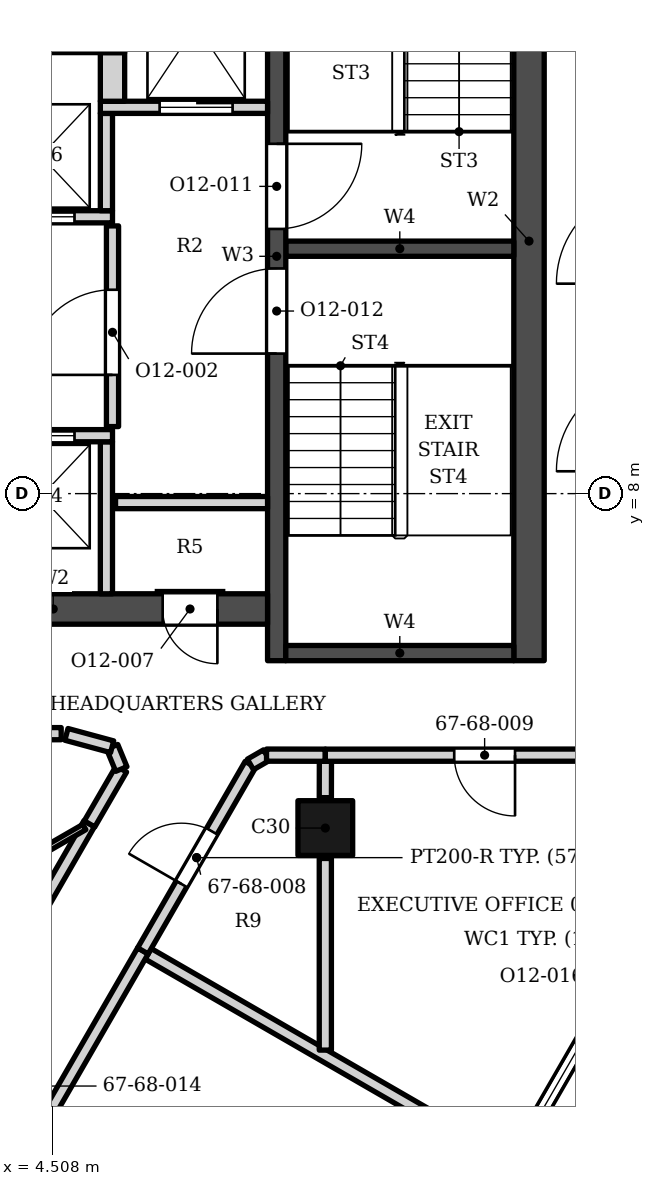
"""IFC4 building model, lengths in metres.
Left out: names, types, materials, properties, quantities, classifications, styles, units other than length and angle.
Written with IfcOpenShell. Run it as: python <this file> out.ifc"""

import sys

from ifc_helpers import new_model, si_unit, direction, frame, frame_2d, origin, origin_2d, place, context, subcontext, project, spatial, rectangle, extrude, element, fill, save


model = new_model("IFC4")
c1 = context("Model", 3, precision=1e-05, world=origin(), true_north=direction((0.0, 1.0)))
c2 = subcontext(c1, "Body", "Model", "MODEL_VIEW")
j1 = project(units=[si_unit("LENGTHUNIT", "METRE"), si_unit("PLANEANGLEUNIT", "RADIAN")], contexts=[c1])
p1 = place(None, origin())
s1 = spatial("IfcSite", under=j1, at=p1, CompositionType="ELEMENT")
p2 = place(p1, origin())
s2 = spatial("IfcBuilding", under=s1, at=p2, CompositionType="ELEMENT")
p3 = place(p2, frame((0.0, 0.0, 279.4)))
s3 = spatial("IfcBuildingStorey", under=s2, at=p3, CompositionType="ELEMENT", Elevation=279.4)
p4 = place(p3, frame((12.35, 5.253, 0.0), z_axis=(0.0, 0.0, 1.0), x_axis=(0.0, 1.0, 0.0)))
e1 = element("IfcWall", 1, at=p4, inside=s3, PredefinedType="SHEAR", context=c2, shape_type="SweptSolid", body=[
    extrude(rectangle(XDim=13.8, YDim=0.5, at=frame_2d((6.9, 0.0))), origin(), (0.0, 0.0, 1.0), 3.9),
])
p5 = place(p3, frame((8.2, 5.253, 0.0), z_axis=(0.0, 0.0, 1.0), x_axis=(0.0, 1.0, 0.0)))
e2 = element("IfcWall", 2, at=p5, inside=s3, PredefinedType="SHEAR", context=c2, shape_type="SweptSolid", body=[
    extrude(rectangle(XDim=13.3, YDim=0.3, at=frame_2d((6.65, 0.0))), origin(), (0.0, 0.0, 1.0), 3.9),
])
p6 = place(p5, frame((7.1, 0.0, 0.0)))
e3 = element("IfcOpeningElement", 3, at=p6, cuts=e2, PredefinedType="OPENING", context=c2, shape_type="SweptSolid", body=[
    extrude(rectangle(XDim=1.4, YDim=2.1, at=frame_2d((0.7, 1.05))), frame((0.0, 0.16, 0.0), z_axis=(0.0, -1.0, 0.0), x_axis=(1.0, 0.0, 0.0)), (0.0, 0.0, 1.0), 0.32),
])
p7 = place(p5, frame((5.05, 0.0, 0.0)))
e4 = element("IfcOpeningElement", 4, at=p7, cuts=e2, PredefinedType="OPENING", context=c2, shape_type="SweptSolid", body=[
    extrude(rectangle(XDim=1.4, YDim=2.1, at=frame_2d((0.7, 1.05))), frame((0.0, 0.16, 0.0), z_axis=(0.0, -1.0, 0.0), x_axis=(1.0, 0.0, 0.0)), (0.0, 0.0, 1.0), 0.32),
])
for number, where, z_axis, x_axis in (
    (5, (8.35, 12.028, 0.0), (0.0, 0.0, 1.0), (1.0, 0.0, 0.0)),
    (6, (8.35, 5.378, 0.0), (0.0, 0.0, 1.0), (1.0, 0.0, 0.0)),
):
    element("IfcWall", number, at=place(p3, frame(where, z_axis=z_axis, x_axis=x_axis)), inside=s3, PredefinedType="SHEAR", context=c2, shape_type="SweptSolid", body=[
        extrude(rectangle(XDim=3.75, YDim=0.25, at=frame_2d((1.875, 0.0))), origin(), (0.0, 0.0, 1.0), 3.9),
    ])
p8 = place(p3, frame((1.0, 6.103, 0.0), z_axis=(0.0, 0.0, 1.0), x_axis=(1.0, 0.0, 0.0)))
e7 = element("IfcWall", 7, at=p8, inside=s3, PredefinedType="SHEAR", context=c2, shape_type="SweptSolid", body=[
    extrude(rectangle(XDim=7.05, YDim=0.5, at=frame_2d((3.525, 0.0))), origin(), (0.0, 0.0, 1.0), 3.9),
])
p9 = place(p8, frame((5.325, 0.0, 0.0)))
e8 = element("IfcOpeningElement", 8, at=p9, cuts=e7, PredefinedType="OPENING", context=c2, shape_type="SweptSolid", body=[
    extrude(rectangle(XDim=0.9, YDim=2.1, at=frame_2d((0.45, 1.05))), frame((0.0, 0.26, 0.0), z_axis=(0.0, -1.0, 0.0), x_axis=(1.0, 0.0, 0.0)), (0.0, 0.0, 1.0), 0.52),
])
p10 = place(p3, frame((9.0, 2.5, 0.0), z_axis=(0.0, 0.0, 1.0), x_axis=(1.0, 0.0, 0.0)))
e9 = element("IfcColumn", 9, at=p10, inside=s3, PredefinedType="COLUMN", context=c2, shape_type="SweptSolid", body=[
    extrude(rectangle(XDim=0.9, YDim=0.9, at=origin_2d()), origin(), (0.0, 0.0, 1.0), 3.9),
])
p11 = place(p3, frame((12.135, -2.889, 0.0), z_axis=(0.0, 0.0, 1.0), x_axis=(0.500027713859, 0.866009402589, 0.0)))
e10 = element("IfcWall", 10, at=p11, inside=s3, PredefinedType="ELEMENTEDWALL", context=c2, shape_type="SweptSolid", body=[
    extrude(rectangle(XDim=4.2, YDim=0.2, at=frame_2d((2.1, 0.0))), origin(), (0.0, 0.0, 1.0), 3.0),
])
p12 = place(p11, frame((0.2, 0.0, 0.45)))
e11 = element("IfcOpeningElement", 11, at=p12, cuts=e10, PredefinedType="OPENING", context=c2, shape_type="SweptSolid", body=[
    extrude(rectangle(XDim=2.4, YDim=2.25, at=frame_2d((1.2, 1.125))), frame((0.0, 0.11, 0.0), z_axis=(0.0, -1.0, 0.0), x_axis=(1.0, 0.0, 0.0)), (0.0, 0.0, 1.0), 0.22),
])
p13 = place(p11, frame((2.8, 0.0, 0.0)))
e12 = element("IfcOpeningElement", 12, at=p13, cuts=e10, PredefinedType="OPENING", context=c2, shape_type="SweptSolid", body=[
    extrude(rectangle(XDim=1.2, YDim=2.7, at=frame_2d((0.6, 1.35))), frame((0.0, 0.11, 0.0), z_axis=(0.0, -1.0, 0.0), x_axis=(1.0, 0.0, 0.0)), (0.0, 0.0, 1.0), 0.22),
])
for number, where, z_axis, x_axis in (
    (13, (5.4, 6.353, 0.0), (0.0, 0.0, 1.0), (0.0, 1.0, 0.0)),
    (14, (5.55, 7.853, 0.0), (0.0, 0.0, 1.0), (1.0, 0.0, 0.0)),
):
    element("IfcWall", number, at=place(p3, frame(where, z_axis=z_axis, x_axis=x_axis)), inside=s3, PredefinedType="SOLIDWALL", context=c2, shape_type="SweptSolid", body=[
        extrude(rectangle(XDim=2.5, YDim=0.2, at=frame_2d((1.25, 0.0))), origin(), (0.0, 0.0, 1.0), 3.73),
    ])
p14 = place(p3, frame((1.0, 8.953, 0.0), z_axis=(0.0, 0.0, 1.0), x_axis=(1.0, 0.0, 0.0)))
e15 = element("IfcWall", 15, at=p14, inside=s3, PredefinedType="SOLIDWALL", context=c2, shape_type="SweptSolid", body=[
    extrude(rectangle(XDim=4.5, YDim=0.2, at=frame_2d((2.25, 0.0))), origin(), (0.0, 0.0, 1.0), 3.73),
])
p15 = place(p14, frame((0.625, 0.0, 0.0)))
e16 = element("IfcOpeningElement", 16, at=p15, cuts=e15, PredefinedType="OPENING", context=c2, shape_type="SweptSolid", body=[
    extrude(rectangle(XDim=1.1, YDim=2.1, at=frame_2d((0.55, 1.05))), frame((0.0, 0.11, 0.0), z_axis=(0.0, -1.0, 0.0), x_axis=(1.0, 0.0, 0.0)), (0.0, 0.0, 1.0), 0.22),
])
p16 = place(p14, frame((2.775, 0.0, 0.0)))
e17 = element("IfcOpeningElement", 17, at=p16, cuts=e15, PredefinedType="OPENING", context=c2, shape_type="SweptSolid", body=[
    extrude(rectangle(XDim=1.1, YDim=2.1, at=frame_2d((0.55, 1.05))), frame((0.0, 0.11, 0.0), z_axis=(0.0, -1.0, 0.0), x_axis=(1.0, 0.0, 0.0)), (0.0, 0.0, 1.0), 0.22),
])
p17 = place(p3, frame((5.5, 9.103, 0.0), z_axis=(0.0, 0.0, 1.0), x_axis=(0.0, 1.0, 0.0)))
e18 = element("IfcWall", 18, at=p17, inside=s3, PredefinedType="SOLIDWALL", context=c2, shape_type="SweptSolid", body=[
    extrude(rectangle(XDim=3.3, YDim=0.2, at=frame_2d((1.65, 0.0))), origin(), (0.0, 0.0, 1.0), 3.73),
])
p18 = place(p17, frame((0.85, 0.0, 0.0)))
e19 = element("IfcOpeningElement", 19, at=p18, cuts=e18, PredefinedType="OPENING", context=c2, shape_type="SweptSolid", body=[
    extrude(rectangle(XDim=1.4, YDim=2.1, at=frame_2d((0.7, 1.05))), frame((0.0, 0.11, 0.0), z_axis=(0.0, -1.0, 0.0), x_axis=(1.0, 0.0, 0.0)), (0.0, 0.0, 1.0), 0.22),
])
p19 = place(p3, frame((-1.5, 12.552, 0.0), z_axis=(0.0, 0.0, 1.0), x_axis=(1.0, 0.0, 0.0)))
e20 = element("IfcWall", 20, at=p19, inside=s3, PredefinedType="SOLIDWALL", context=c2, shape_type="SweptSolid", body=[
    extrude(rectangle(XDim=7.0, YDim=0.2, at=frame_2d((3.5, 0.0))), origin(), (0.0, 0.0, 1.0), 3.73),
])
p20 = place(p19, frame((3.075, 0.0, 0.0)))
e21 = element("IfcOpeningElement", 21, at=p20, cuts=e20, PredefinedType="OPENING", context=c2, shape_type="SweptSolid", body=[
    extrude(rectangle(XDim=1.1, YDim=2.1, at=frame_2d((0.55, 1.05))), frame((0.0, 0.11, 0.0), z_axis=(0.0, -1.0, 0.0), x_axis=(1.0, 0.0, 0.0)), (0.0, 0.0, 1.0), 0.22),
])
p21 = place(p19, frame((5.275, 0.0, 0.0)))
e22 = element("IfcOpeningElement", 22, at=p21, cuts=e20, PredefinedType="OPENING", context=c2, shape_type="SweptSolid", body=[
    extrude(rectangle(XDim=1.1, YDim=2.1, at=frame_2d((0.55, 1.05))), frame((0.0, 0.11, 0.0), z_axis=(0.0, -1.0, 0.0), x_axis=(1.0, 0.0, 0.0)), (0.0, 0.0, 1.0), 0.22),
])
p22 = place(p3, frame((5.4, 12.653, 0.0), z_axis=(0.0, 0.0, 1.0), x_axis=(0.0, 1.0, 0.0)))
e23 = element("IfcWall", 23, at=p22, inside=s3, PredefinedType="SOLIDWALL", context=c2, shape_type="SweptSolid", body=[
    extrude(rectangle(XDim=1.6, YDim=0.2, at=frame_2d((0.8, 0.0))), origin(), (0.0, 0.0, 1.0), 3.73),
])
p23 = place(p3, frame((5.3, 14.353, 0.0), z_axis=(0.0, 0.0, 1.0), x_axis=(1.0, 0.0, 0.0)))
e24 = element("IfcWall", 24, at=p23, inside=s3, PredefinedType="SOLIDWALL", context=c2, shape_type="SweptSolid", body=[
    extrude(rectangle(XDim=2.75, YDim=0.2, at=frame_2d((1.375, 0.0))), origin(), (0.0, 0.0, 1.0), 3.73),
])
p24 = place(p23, frame((0.975, 0.0, 0.0)))
e25 = element("IfcOpeningElement", 25, at=p24, cuts=e24, PredefinedType="OPENING", context=c2, shape_type="SweptSolid", body=[
    extrude(rectangle(XDim=1.2, YDim=2.1, at=frame_2d((0.6, 1.05))), frame((0.0, 0.11, 0.0), z_axis=(0.0, -1.0, 0.0), x_axis=(1.0, 0.0, 0.0)), (0.0, 0.0, 1.0), 0.22),
])
p25 = place(p3, frame((5.5, 14.453, 0.0), z_axis=(0.0, 0.0, 1.0), x_axis=(0.0, 1.0, 0.0)))
e26 = element("IfcWall", 26, at=p25, inside=s3, PredefinedType="SOLIDWALL", context=c2, shape_type="SweptSolid", body=[
    extrude(rectangle(XDim=0.8, YDim=0.4, at=frame_2d((0.4, 0.0))), origin(), (0.0, 0.0, 1.0), 3.73),
])
p26 = place(p3, frame((-1.5, 15.353, 0.0), z_axis=(0.0, 0.0, 1.0), x_axis=(1.0, 0.0, 0.0)))
e27 = element("IfcWall", 27, at=p26, inside=s3, PredefinedType="SOLIDWALL", context=c2, shape_type="SweptSolid", body=[
    extrude(rectangle(XDim=7.2, YDim=0.2, at=frame_2d((3.6, 0.0))), origin(), (0.0, 0.0, 1.0), 3.73),
])
p27 = place(p3, frame((0.898, -4.751, 0.0), z_axis=(0.0, 0.0, 1.0), x_axis=(0.499141293918, 0.866520610664, 0.0)))
e28 = element("IfcWall", 28, at=p27, inside=s3, PredefinedType="PARTITIONING", context=c2, shape_type="SweptSolid", body=[
    extrude(rectangle(XDim=8.451, YDim=0.2, at=frame_2d((4.226, 0.0))), origin(), (0.0, 0.0, 1.0), 2.884),
])
p28 = place(p3, frame((6.086, 0.433, 0.0), z_axis=(0.0, 0.0, 1.0), x_axis=(0.866035557451, -0.499982412921, 0.0)))
e29 = element("IfcWall", 29, at=p28, inside=s3, PredefinedType="PARTITIONING", context=c2, shape_type="SweptSolid", body=[
    extrude(rectangle(XDim=6.449, YDim=0.2, at=frame_2d((3.225, 0.0))), origin(), (0.0, 0.0, 1.0), 3.052),
])
p29 = place(p3, frame((1.5, -7.314, 0.0), z_axis=(0.0, 0.0, 1.0), x_axis=(0.499990139034, 0.866031096941, 0.0)))
e30 = element("IfcWall", 30, at=p29, inside=s3, PredefinedType="PARTITIONING", context=c2, shape_type="SweptSolid", body=[
    extrude(rectangle(XDim=9.0, YDim=0.2, at=frame_2d((4.5, 0.0))), origin(), (0.0, 0.0, 1.0), 2.884),
])
p30 = place(p29, frame((4.0, 0.0, 0.0)))
e31 = element("IfcOpeningElement", 31, at=p30, cuts=e30, PredefinedType="OPENING", context=c2, shape_type="SweptSolid", body=[
    extrude(rectangle(XDim=1.0, YDim=2.1, at=frame_2d((0.5, 1.05))), frame((0.0, 0.11, 0.0), z_axis=(0.0, -1.0, 0.0), x_axis=(1.0, 0.0, 0.0)), (0.0, 0.0, 1.0), 0.22),
])
p31 = place(p3, frame((9.0, -1.152, 0.0), z_axis=(0.0, 0.0, 1.0), x_axis=(0.0, 1.0, 0.0)))
e32 = element("IfcWall", 32, at=p31, inside=s3, PredefinedType="PARTITIONING", context=c2, shape_type="SweptSolid", body=[
    extrude(rectangle(XDim=3.152, YDim=0.2, at=frame_2d((1.576, 0.0))), origin(), (0.0, 0.0, 1.0), 3.052),
])
p32 = place(p3, frame((0.19, -0.281, 0.0), z_axis=(0.0, 0.0, 1.0), x_axis=(0.866035935605, 0.499981757907, 0.0)))
e33 = element("IfcWall", 33, at=p32, inside=s3, PredefinedType="PARTITIONING", context=c2, shape_type="SweptSolid", body=[
    extrude(rectangle(XDim=5.596, YDim=0.1, at=frame_2d((2.798, 0.0))), origin(), (0.0, 0.0, 1.0), 2.884),
])
p33 = place(p3, frame((5.122, 2.569, 0.0), z_axis=(0.0, 0.0, 1.0), x_axis=(0.501525356051, 0.86514294613, 0.0)))
e34 = element("IfcWall", 34, at=p33, inside=s3, PredefinedType="PARTITIONING", context=c2, shape_type="SweptSolid", body=[
    extrude(rectangle(XDim=1.043, YDim=0.2, at=frame_2d((0.521, 0.0))), origin(), (0.0, 0.0, 1.0), 3.73),
])
p34 = place(p3, frame((5.494, 3.837, 0.0), z_axis=(0.0, 0.0, 1.0), x_axis=(0.381462580175, -0.924384281523, 0.0)))
e35 = element("IfcWall", 35, at=p34, inside=s3, PredefinedType="PARTITIONING", context=c2, shape_type="SweptSolid", body=[
    extrude(rectangle(XDim=0.396, YDim=0.2, at=frame_2d((0.198, 0.0))), origin(), (0.0, 0.0, 1.0), 3.73),
])
p35 = place(p3, frame((6.0, 0.481, 0.0), z_axis=(0.0, 0.0, 1.0), x_axis=(0.499648797631, 0.866228075639, 0.0)))
e36 = element("IfcWall", 36, at=p35, inside=s3, PredefinedType="PARTITIONING", context=c2, shape_type="SweptSolid", body=[
    extrude(rectangle(XDim=3.539, YDim=0.2, at=frame_2d((1.77, 0.0))), origin(), (0.0, 0.0, 1.0), 3.73),
])
p36 = place(p35, frame((1.27, 0.0, 0.0)))
e37 = element("IfcOpeningElement", 37, at=p36, cuts=e36, PredefinedType="OPENING", context=c2, shape_type="SweptSolid", body=[
    extrude(rectangle(XDim=1.0, YDim=2.4, at=frame_2d((0.5, 1.2))), frame((0.0, 0.11, 0.0), z_axis=(0.0, -1.0, 0.0), x_axis=(1.0, 0.0, 0.0)), (0.0, 0.0, 1.0), 0.22),
])
p37 = place(p3, frame((9.0, 3.0, 0.0), z_axis=(0.0, 0.0, 1.0), x_axis=(0.002442989453, 0.999997015897, 0.0)))
e38 = element("IfcWall", 38, at=p37, inside=s3, PredefinedType="PARTITIONING", context=c2, shape_type="SweptSolid", body=[
    extrude(rectangle(XDim=0.6, YDim=0.2, at=frame_2d((0.3, 0.0))), origin(), (0.0, 0.0, 1.0), 3.332),
])
p38 = place(p3, frame((7.768, 3.546, 0.0), z_axis=(0.0, 0.0, 1.0), x_axis=(0.865826662844, 0.500344071524, 0.0)))
e39 = element("IfcWall", 39, at=p38, inside=s3, PredefinedType="PARTITIONING", context=c2, shape_type="SweptSolid", body=[
    extrude(rectangle(XDim=0.306, YDim=0.2, at=frame_2d((0.153, 0.0))), origin(), (0.0, 0.0, 1.0), 3.73),
])
p39 = place(p3, frame((8.033, 3.699, 0.0), z_axis=(0.0, 0.0, 1.0), x_axis=(0.99999885216, -0.001515149776, 0.0)))
e40 = element("IfcWall", 40, at=p39, inside=s3, PredefinedType="PARTITIONING", context=c2, shape_type="SweptSolid", body=[
    extrude(rectangle(XDim=0.967, YDim=0.2, at=frame_2d((0.483, 0.0))), origin(), (0.0, 0.0, 1.0), 3.73),
])
p40 = place(p3, frame((9.0, 3.698, 0.0), z_axis=(0.0, 0.0, 1.0), x_axis=(0.999999960922, 0.000279563869, 0.0)))
e41 = element("IfcWall", 41, at=p40, inside=s3, PredefinedType="PARTITIONING", context=c2, shape_type="SweptSolid", body=[
    extrude(rectangle(XDim=5.24, YDim=0.2, at=frame_2d((2.62, 0.0))), origin(), (0.0, 0.0, 1.0), 3.73),
])
p41 = place(p40, frame((2.12, 0.0, 0.0)))
e42 = element("IfcOpeningElement", 42, at=p41, cuts=e41, PredefinedType="OPENING", context=c2, shape_type="SweptSolid", body=[
    extrude(rectangle(XDim=1.0, YDim=2.4, at=frame_2d((0.5, 1.2))), frame((0.0, 0.11, 0.0), z_axis=(0.0, -1.0, 0.0), x_axis=(1.0, 0.0, 0.0)), (0.0, 0.0, 1.0), 0.22),
])
p42 = place(p3, frame((4.742, 4.041, 0.0), z_axis=(0.0, 0.0, 1.0), x_axis=(0.965081274591, -0.261950631675, 0.0)))
e43 = element("IfcWall", 43, at=p42, inside=s3, PredefinedType="PARTITIONING", context=c2, shape_type="SweptSolid", body=[
    extrude(rectangle(XDim=0.779, YDim=0.2, at=frame_2d((0.39, 0.0))), origin(), (0.0, 0.0, 1.0), 3.73),
])
p43 = place(p3, frame((3.502, 4.051, 0.0), z_axis=(0.0, 0.0, 1.0), x_axis=(0.999998904, 0.001480539832, 0.0)))
e44 = element("IfcWall", 44, at=p43, inside=s3, PredefinedType="PARTITIONING", context=c2, shape_type="SweptSolid", body=[
    extrude(rectangle(XDim=1.154, YDim=0.2, at=frame_2d((0.577, 0.0))), origin(), (0.0, 0.0, 1.0), 3.73),
])
p44 = place(p12, origin())
e45 = element("IfcWindow", 45, at=p44, inside=s3, PartitioningType="SINGLE_PANEL", PredefinedType="WINDOW", context=c2, shape_type="SweptSolid", body=[
    extrude(rectangle(XDim=2.4, YDim=2.25, at=frame_2d((1.2, 1.125))), frame((0.0, 0.03, 0.0), z_axis=(0.0, -1.0, 0.0), x_axis=(1.0, 0.0, 0.0)), (0.0, 0.0, 1.0), 0.06),
])
fill(e11, e45)
p45 = place(p16, origin())
e46 = element("IfcDoor", 46, at=p45, inside=s3, OperationType="DOUBLE_DOOR_SLIDING", PredefinedType="DOOR", context=c2, shape_type="SweptSolid", body=[
    extrude(rectangle(XDim=1.1, YDim=2.1, at=frame_2d((0.55, 1.05))), frame((0.0, 0.025, 0.0), z_axis=(0.0, -1.0, 0.0), x_axis=(1.0, 0.0, 0.0)), (0.0, 0.0, 1.0), 0.05),
])
fill(e17, e46)
p46 = place(p21, origin())
e47 = element("IfcDoor", 47, at=p46, inside=s3, OperationType="DOUBLE_DOOR_SLIDING", PredefinedType="DOOR", context=c2, shape_type="SweptSolid", body=[
    extrude(rectangle(XDim=1.1, YDim=2.1, at=frame_2d((0.55, 1.05))), frame((0.0, 0.025, 0.0), z_axis=(0.0, -1.0, 0.0), x_axis=(1.0, 0.0, 0.0)), (0.0, 0.0, 1.0), 0.05),
])
fill(e22, e47)
p47 = place(p24, origin())
e48 = element("IfcDoor", 48, at=p47, inside=s3, OperationType="DOUBLE_DOOR_SLIDING", PredefinedType="DOOR", context=c2, shape_type="SweptSolid", body=[
    extrude(rectangle(XDim=1.2, YDim=2.1, at=frame_2d((0.6, 1.05))), frame((0.0, 0.025, 0.0), z_axis=(0.0, -1.0, 0.0), x_axis=(1.0, 0.0, 0.0)), (0.0, 0.0, 1.0), 0.05),
])
fill(e25, e48)
p48 = place(p6, origin())
e49 = element("IfcDoor", 49, at=p48, inside=s3, OperationType="SINGLE_SWING_RIGHT", PredefinedType="DOOR", context=c2, shape_type="SweptSolid", body=[
    extrude(rectangle(XDim=1.4, YDim=2.1, at=frame_2d((0.7, 1.05))), frame((0.0, 0.025, 0.0), z_axis=(0.0, -1.0, 0.0), x_axis=(1.0, 0.0, 0.0)), (0.0, 0.0, 1.0), 0.05),
])
fill(e3, e49)
p49 = place(p7, origin())
e50 = element("IfcDoor", 50, at=p49, inside=s3, OperationType="SINGLE_SWING_LEFT", PredefinedType="DOOR", context=c2, shape_type="SweptSolid", body=[
    extrude(rectangle(XDim=1.4, YDim=2.1, at=frame_2d((0.7, 1.05))), frame((0.0, 0.025, 0.0), z_axis=(0.0, -1.0, 0.0), x_axis=(1.0, 0.0, 0.0)), (0.0, 0.0, 1.0), 0.05),
])
fill(e4, e50)
p50 = place(p18, origin())
e51 = element("IfcDoor", 51, at=p50, inside=s3, OperationType="SINGLE_SWING_LEFT", PredefinedType="DOOR", context=c2, shape_type="SweptSolid", body=[
    extrude(rectangle(XDim=1.4, YDim=2.1, at=frame_2d((0.7, 1.05))), frame((0.0, 0.025, 0.0), z_axis=(0.0, -1.0, 0.0), x_axis=(1.0, 0.0, 0.0)), (0.0, 0.0, 1.0), 0.05),
])
fill(e19, e51)
p51 = place(p9, origin())
e52 = element("IfcDoor", 52, at=p51, inside=s3, OperationType="SINGLE_SWING_RIGHT", PredefinedType="DOOR", context=c2, shape_type="SweptSolid", body=[
    extrude(rectangle(XDim=0.9, YDim=2.1, at=frame_2d((0.45, 1.05))), frame((0.0, 0.025, 0.0), z_axis=(0.0, -1.0, 0.0), x_axis=(1.0, 0.0, 0.0)), (0.0, 0.0, 1.0), 0.05),
])
fill(e8, e52)
p52 = place(p36, origin())
e53 = element("IfcDoor", 53, at=p52, inside=s3, OperationType="SINGLE_SWING_LEFT", PredefinedType="DOOR", context=c2, shape_type="SweptSolid", body=[
    extrude(rectangle(XDim=1.0, YDim=2.4, at=frame_2d((0.5, 1.2))), frame((0.0, 0.025, 0.0), z_axis=(0.0, -1.0, 0.0), x_axis=(1.0, 0.0, 0.0)), (0.0, 0.0, 1.0), 0.05),
])
fill(e37, e53)
p53 = place(p41, origin())
e54 = element("IfcDoor", 54, at=p53, inside=s3, OperationType="SINGLE_SWING_RIGHT", PredefinedType="DOOR", context=c2, shape_type="SweptSolid", body=[
    extrude(rectangle(XDim=1.0, YDim=2.4, at=frame_2d((0.5, 1.2))), frame((0.0, 0.025, 0.0), z_axis=(0.0, -1.0, 0.0), x_axis=(1.0, 0.0, 0.0)), (0.0, 0.0, 1.0), 0.05),
])
fill(e42, e54)
save(model, sys.argv[1])
